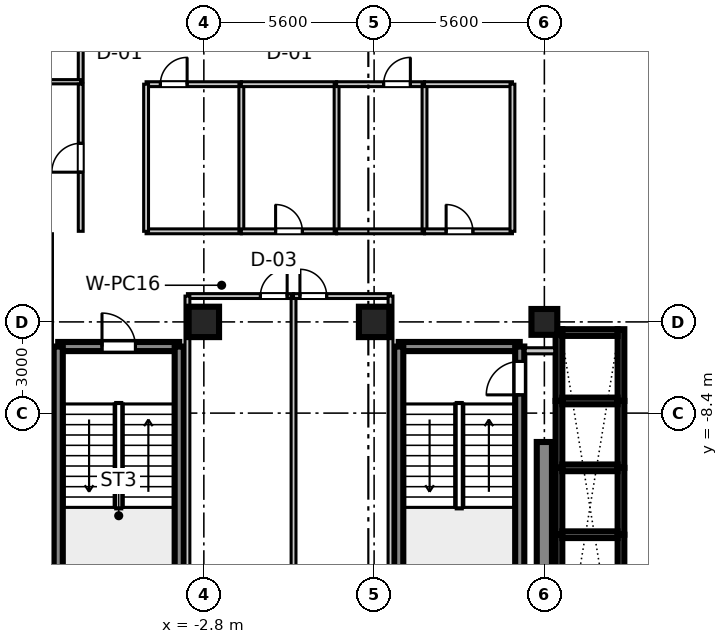
"""IFC4 building model, lengths in metres.
Left out: names, types, materials, properties, quantities, classifications, styles, units other than length and angle.
Written with IfcOpenShell. Run it as: python <this file> out.ifc"""

import sys

from ifc_helpers import new_model, si_unit, direction, frame, frame_2d, origin, origin_2d, place, context, subcontext, project, spatial, rectangle, extrude, source, transform, mapped, element, fill, save


model = new_model("IFC4")
c1 = context("Model", 3, precision=1e-05, world=origin(), true_north=direction((0.0, 1.0)))
c2 = subcontext(c1, "Body", "Model", "MODEL_VIEW")
j1 = project(units=[si_unit("LENGTHUNIT", "METRE"), si_unit("PLANEANGLEUNIT", "RADIAN")], contexts=[c1])
p1 = place(None, origin())
s1 = spatial("IfcSite", under=j1, at=p1, CompositionType="ELEMENT")
p2 = place(p1, origin())
s2 = spatial("IfcBuilding", under=s1, at=p2, CompositionType="ELEMENT")
p3 = place(p2, frame((0.0, 0.0, 227.1)))
s3 = spatial("IfcBuildingStorey", under=s2, at=p3, CompositionType="ELEMENT", Elevation=227.1)
m1 = source(origin(), c2, "Body", "SweptSolid", [
    extrude(rectangle(XDim=1.0, YDim=1.0, at=origin_2d()), origin(), (0.0, 0.0, 1.0), 3.655),
])
for number, where, z_axis, x_axis in (
    (1, (-2.8, -5.4, 0.0), (0.0, 0.0, 1.0), (1.0, 0.0, 0.0)),
    (2, (2.8, -5.4, 0.0), (0.0, 0.0, 1.0), (1.0, 0.0, 0.0)),
):
    element("IfcColumn", number, at=place(p3, frame(where, z_axis=z_axis, x_axis=x_axis)), inside=s3, PredefinedType="COLUMN", context=c2, shape_type="MappedRepresentation", body=[
        mapped(m1, transform((0.0, 0.0, 0.0), scale=1.0)),
    ])
m2 = source(origin(), c2, "Body", "SweptSolid", [
    extrude(rectangle(XDim=0.85, YDim=0.85, at=origin_2d()), origin(), (0.0, 0.0, 1.0), 3.655),
])
p4 = place(p3, frame((8.4, -5.4, 0.0), z_axis=(0.0, 0.0, 1.0), x_axis=(1.0, 0.0, 0.0)))
e3 = element("IfcColumn", 3, at=p4, inside=s3, PredefinedType="PILASTER", context=c2, shape_type="MappedRepresentation", body=[
    mapped(m2, transform((0.0, 0.0, 0.0), scale=1.0)),
])
m3 = source(origin(), c2, "Body", "SweptSolid", [
    extrude(rectangle(XDim=7.65, YDim=0.5, at=frame_2d((3.825, 0.0))), origin(), (0.0, 0.0, 1.0), 3.41),
])
p5 = place(p3, frame((8.4, -17.0, 0.0), z_axis=(0.0, 0.0, 1.0), x_axis=(0.0, 1.0, 0.0)))
e4 = element("IfcWall", 4, at=p5, inside=s3, PredefinedType="SHEAR", context=c2, shape_type="MappedRepresentation", body=[
    mapped(m3, transform((0.0, 0.0, 0.0), scale=1.0)),
])
m4 = source(origin(), c2, "Body", "SweptSolid", [
    extrude(rectangle(XDim=3.98, YDim=0.3, at=frame_2d((1.99, 0.0))), origin(), (0.0, 0.0, 1.0), 3.41),
])
p6 = place(p3, frame((3.61, -6.21, 0.0), z_axis=(0.0, 0.0, 1.0), x_axis=(1.0, 0.0, 0.0)))
e5 = element("IfcWall", 5, at=p6, inside=s3, PredefinedType="SHEAR", context=c2, shape_type="MappedRepresentation", body=[
    mapped(m4, transform((0.0, 0.0, 0.0), scale=1.0)),
])
m5 = source(origin(), c2, "Body", "SweptSolid", [
    extrude(rectangle(XDim=9.38, YDim=0.3, at=frame_2d((4.69, 0.0))), origin(), (0.0, 0.0, 1.0), 3.41),
])
p7 = place(p3, frame((3.61, -15.59, 0.0), z_axis=(0.0, 0.0, 1.0), x_axis=(0.0, 1.0, 0.0)))
e6 = element("IfcWall", 6, at=p7, inside=s3, PredefinedType="SHEAR", context=c2, shape_type="MappedRepresentation", body=[
    mapped(m5, transform((0.0, 0.0, 0.0), scale=1.0)),
])
p8 = place(p3, frame((7.59, -15.59, 0.0), z_axis=(0.0, 0.0, 1.0), x_axis=(0.0, 1.0, 0.0)))
e7 = element("IfcWall", 7, at=p8, inside=s3, PredefinedType="SHEAR", context=c2, shape_type="MappedRepresentation", body=[
    mapped(m5, transform((0.0, 0.0, 0.0), scale=1.0)),
])
p9 = place(p8, frame((7.79, 0.0, 0.0)))
e8 = element("IfcOpeningElement", 8, at=p9, cuts=e7, PredefinedType="OPENING", context=c2, shape_type="SweptSolid", body=[
    extrude(rectangle(XDim=1.1, YDim=2.15, at=frame_2d((0.55, 1.075))), frame((0.0, 0.16, 0.0), z_axis=(0.0, -1.0, 0.0), x_axis=(1.0, 0.0, 0.0)), (0.0, 0.0, 1.0), 0.32),
])
p10 = place(p3, frame((-7.59, -6.21, 0.0), z_axis=(0.0, 0.0, 1.0), x_axis=(1.0, 0.0, 0.0)))
e9 = element("IfcWall", 9, at=p10, inside=s3, PredefinedType="SHEAR", context=c2, shape_type="MappedRepresentation", body=[
    mapped(m4, transform((0.0, 0.0, 0.0), scale=1.0)),
])
p11 = place(p10, frame((1.44, 0.0, 0.0)))
e10 = element("IfcOpeningElement", 10, at=p11, cuts=e9, PredefinedType="OPENING", context=c2, shape_type="SweptSolid", body=[
    extrude(rectangle(XDim=1.1, YDim=2.15, at=frame_2d((0.55, 1.075))), frame((0.0, 0.16, 0.0), z_axis=(0.0, -1.0, 0.0), x_axis=(1.0, 0.0, 0.0)), (0.0, 0.0, 1.0), 0.32),
])
for number, where, z_axis, x_axis in (
    (11, (-7.59, -15.59, 0.0), (0.0, 0.0, 1.0), (0.0, 1.0, 0.0)),
    (12, (-3.61, -15.59, 0.0), (0.0, 0.0, 1.0), (0.0, 1.0, 0.0)),
):
    element("IfcWall", number, at=place(p3, frame(where, z_axis=z_axis, x_axis=x_axis)), inside=s3, PredefinedType="SHEAR", context=c2, shape_type="MappedRepresentation", body=[
        mapped(m5, transform((0.0, 0.0, 0.0), scale=1.0)),
    ])
m6 = source(origin(), c2, "Body", "SweptSolid", [
    extrude(rectangle(XDim=2.36, YDim=0.22, at=frame_2d((1.18, 0.0))), origin(), (0.0, 0.0, 1.0), 3.41),
])
for number, where, z_axis, x_axis in (
    (13, (8.88, -8.0, 0.0), (0.0, 0.0, 1.0), (0.0, 1.0, 0.0)),
    (14, (10.92, -8.0, 0.0), (0.0, 0.0, 1.0), (0.0, 1.0, 0.0)),
):
    element("IfcWall", number, at=place(p3, frame(where, z_axis=z_axis, x_axis=x_axis)), inside=s3, PredefinedType="SHEAR", context=c2, shape_type="MappedRepresentation", body=[
        mapped(m6, transform((0.0, 0.0, 0.0), scale=1.0)),
    ])
m7 = source(origin(), c2, "Body", "SweptSolid", [
    extrude(rectangle(XDim=1.82, YDim=0.22, at=frame_2d((0.91, 0.0))), origin(), (0.0, 0.0, 1.0), 3.41),
])
p12 = place(p3, frame((8.99, -5.75, 0.0), z_axis=(0.0, 0.0, 1.0), x_axis=(1.0, 0.0, 0.0)))
e15 = element("IfcWall", 15, at=p12, inside=s3, PredefinedType="SHEAR", context=c2, shape_type="MappedRepresentation", body=[
    mapped(m7, transform((0.0, 0.0, 0.0), scale=1.0)),
])
m8 = source(origin(), c2, "Body", "SweptSolid", [
    extrude(rectangle(XDim=2.2, YDim=0.22, at=frame_2d((1.1, 0.0))), origin(), (0.0, 0.0, 1.0), 3.41),
])
for number, where, z_axis, x_axis in (
    (16, (8.88, -10.2, 0.0), (0.0, 0.0, 1.0), (0.0, 1.0, 0.0)),
    (17, (10.92, -10.2, 0.0), (0.0, 0.0, 1.0), (0.0, 1.0, 0.0)),
):
    element("IfcWall", number, at=place(p3, frame(where, z_axis=z_axis, x_axis=x_axis)), inside=s3, PredefinedType="SHEAR", context=c2, shape_type="MappedRepresentation", body=[
        mapped(m8, transform((0.0, 0.0, 0.0), scale=1.0)),
    ])
m9 = source(origin(), c2, "Body", "SweptSolid", [
    extrude(rectangle(XDim=1.82, YDim=0.22, at=frame_2d((0.91, 0.0))), origin(), (0.0, 0.0, 1.0), 3.7),
])
p13 = place(p3, frame((8.99, -8.0, 0.0), z_axis=(0.0, 0.0, 1.0), x_axis=(1.0, 0.0, 0.0)))
e18 = element("IfcWall", 18, at=p13, inside=s3, PredefinedType="SHEAR", context=c2, shape_type="MappedRepresentation", body=[
    mapped(m9, transform((0.0, 0.0, 0.0), scale=1.0)),
])
for number, where, z_axis, x_axis in (
    (19, (8.88, -12.4, 0.0), (0.0, 0.0, 1.0), (0.0, 1.0, 0.0)),
    (20, (10.92, -12.4, 0.0), (0.0, 0.0, 1.0), (0.0, 1.0, 0.0)),
):
    element("IfcWall", number, at=place(p3, frame(where, z_axis=z_axis, x_axis=x_axis)), inside=s3, PredefinedType="SHEAR", context=c2, shape_type="MappedRepresentation", body=[
        mapped(m8, transform((0.0, 0.0, 0.0), scale=1.0)),
    ])
p14 = place(p3, frame((8.99, -10.2, 0.0), z_axis=(0.0, 0.0, 1.0), x_axis=(1.0, 0.0, 0.0)))
e21 = element("IfcWall", 21, at=p14, inside=s3, PredefinedType="SHEAR", context=c2, shape_type="MappedRepresentation", body=[
    mapped(m9, transform((0.0, 0.0, 0.0), scale=1.0)),
])
m10 = source(origin(), c2, "Body", "SweptSolid", [
    extrude(rectangle(XDim=2.325, YDim=0.22, at=frame_2d((1.163, 0.0))), origin(), (0.0, 0.0, 1.0), 3.41),
])
for number, where, z_axis, x_axis in (
    (22, (8.88, -14.725, 0.0), (0.0, 0.0, 1.0), (0.0, 1.0, 0.0)),
    (23, (10.92, -14.725, 0.0), (0.0, 0.0, 1.0), (0.0, 1.0, 0.0)),
):
    element("IfcWall", number, at=place(p3, frame(where, z_axis=z_axis, x_axis=x_axis)), inside=s3, PredefinedType="SHEAR", context=c2, shape_type="MappedRepresentation", body=[
        mapped(m10, transform((0.0, 0.0, 0.0), scale=1.0)),
    ])
p15 = place(p3, frame((8.99, -12.4, 0.0), z_axis=(0.0, 0.0, 1.0), x_axis=(1.0, 0.0, 0.0)))
e24 = element("IfcWall", 24, at=p15, inside=s3, PredefinedType="SHEAR", context=c2, shape_type="MappedRepresentation", body=[
    mapped(m9, transform((0.0, 0.0, 0.0), scale=1.0)),
])
m11 = source(origin(), c2, "Body", "SweptSolid", [
    extrude(rectangle(XDim=0.97, YDim=0.2, at=frame_2d((0.485, 0.0))), origin(), (0.0, 0.0, 1.0), 2.75),
])
p16 = place(p3, frame((7.77, -6.35, 0.0), z_axis=(0.0, 0.0, 1.0), x_axis=(1.0, 0.0, 0.0)))
e25 = element("IfcWall", 25, at=p16, inside=s3, PredefinedType="PARTITIONING", context=c2, shape_type="MappedRepresentation", body=[
    mapped(m11, transform((0.0, 0.0, 0.0), scale=1.0)),
])
m12 = source(origin(), c2, "Body", "SweptSolid", [
    extrude(rectangle(XDim=21.4, YDim=0.16, at=frame_2d((10.7, 0.0))), origin(), (0.0, 0.0, 1.0), 2.75),
])
p17 = place(p3, frame((-6.85, 2.5, 0.0), z_axis=(0.0, 0.0, 1.0), x_axis=(0.0, 1.0, 0.0)))
e26 = element("IfcWall", 26, at=p17, inside=s3, PredefinedType="PARTITIONING", context=c2, shape_type="MappedRepresentation", body=[
    mapped(m12, transform((0.0, 0.0, 0.0), scale=1.0)),
])
p18 = place(p17, frame((8.15, 0.0, 0.0)))
e27 = element("IfcOpeningElement", 27, at=p18, cuts=e26, PredefinedType="OPENING", context=c2, shape_type="SweptSolid", body=[
    extrude(rectangle(XDim=0.95, YDim=2.1, at=frame_2d((0.475, 1.05))), frame((0.0, 0.09, 0.0), z_axis=(0.0, -1.0, 0.0), x_axis=(1.0, 0.0, 0.0)), (0.0, 0.0, 1.0), 0.18),
])
m13 = source(origin(), c2, "Body", "SweptSolid", [
    extrude(rectangle(XDim=14.31, YDim=0.14, at=frame_2d((7.155, 0.0))), origin(), (0.0, 0.0, 1.0), 2.75),
])
p19 = place(p3, frame((-21.16, 2.5, 0.0), z_axis=(0.0, 0.0, 1.0), x_axis=(1.0, 0.0, 0.0)))
e28 = element("IfcWall", 28, at=p19, inside=s3, PredefinedType="PARTITIONING", context=c2, shape_type="MappedRepresentation", body=[
    mapped(m13, transform((0.0, 0.0, 0.0), scale=1.0)),
])
m14 = source(origin(), c2, "Body", "SweptSolid", [
    extrude(rectangle(XDim=10.7, YDim=0.16, at=frame_2d((5.35, 0.0))), origin(), (0.0, 0.0, 1.0), 2.75),
])
p20 = place(p3, frame((-7.86, -23.9, 0.0), z_axis=(0.0, 0.0, 1.0), x_axis=(0.0, 1.0, 0.0)))
e29 = element("IfcWall", 29, at=p20, inside=s3, PredefinedType="PARTITIONING", context=c2, shape_type="MappedRepresentation", body=[
    mapped(m14, transform((0.0, 0.0, 0.0), scale=1.0)),
])
p21 = place(p3, frame((-7.86, -13.2, 0.0), z_axis=(0.0, 0.0, 1.0), x_axis=(0.0, 1.0, 0.0)))
e30 = element("IfcWall", 30, at=p21, inside=s3, PredefinedType="PARTITIONING", context=c2, shape_type="MappedRepresentation", body=[
    mapped(m14, transform((0.0, 0.0, 0.0), scale=1.0)),
])
p22 = place(p21, frame((9.26, 0.0, 0.0)))
e31 = element("IfcOpeningElement", 31, at=p22, cuts=e30, PredefinedType="OPENING", context=c2, shape_type="SweptSolid", body=[
    extrude(rectangle(XDim=0.88, YDim=2.1, at=frame_2d((0.44, 1.05))), frame((0.0, 0.09, 0.0), z_axis=(0.0, -1.0, 0.0), x_axis=(1.0, 0.0, 0.0)), (0.0, 0.0, 1.0), 0.18),
])
m15 = source(origin(), c2, "Body", "SweptSolid", [
    extrude(rectangle(XDim=3.49, YDim=0.16, at=frame_2d((1.745, 0.0))), origin(), (0.0, 0.0, 1.0), 2.75),
])
p23 = place(p3, frame((-3.34, -4.55, 0.0), z_axis=(0.0, 0.0, 1.0), x_axis=(1.0, 0.0, 0.0)))
e32 = element("IfcWall", 32, at=p23, inside=s3, PredefinedType="PARTITIONING", context=c2, shape_type="MappedRepresentation", body=[
    mapped(m15, transform((0.0, 0.0, 0.0), scale=1.0)),
])
p24 = place(p23, frame((2.4, 0.0, 0.0)))
e33 = element("IfcOpeningElement", 33, at=p24, cuts=e32, PredefinedType="OPENING", context=c2, shape_type="SweptSolid", body=[
    extrude(rectangle(XDim=0.88, YDim=2.1, at=frame_2d((0.44, 1.05))), frame((0.0, 0.09, 0.0), z_axis=(0.0, -1.0, 0.0), x_axis=(1.0, 0.0, 0.0)), (0.0, 0.0, 1.0), 0.18),
])
m16 = source(origin(), c2, "Body", "SweptSolid", [
    extrude(rectangle(XDim=19.35, YDim=0.16, at=frame_2d((9.675, 0.0))), origin(), (0.0, 0.0, 1.0), 2.75),
])
for number, where, z_axis, x_axis in (
    (34, (-3.34, -23.9, 0.0), (0.0, 0.0, 1.0), (0.0, 1.0, 0.0)),
    (35, (0.15, -23.9, 0.0), (0.0, 0.0, 1.0), (0.0, 1.0, 0.0)),
):
    element("IfcWall", number, at=place(p3, frame(where, z_axis=z_axis, x_axis=x_axis)), inside=s3, PredefinedType="PARTITIONING", context=c2, shape_type="MappedRepresentation", body=[
        mapped(m16, transform((0.0, 0.0, 0.0), scale=1.0)),
    ])
m17 = source(origin(), c2, "Body", "SweptSolid", [
    extrude(rectangle(XDim=3.19, YDim=0.16, at=frame_2d((1.595, 0.0))), origin(), (0.0, 0.0, 1.0), 2.75),
])
p25 = place(p3, frame((0.15, -4.55, 0.0), z_axis=(0.0, 0.0, 1.0), x_axis=(1.0, 0.0, 0.0)))
e36 = element("IfcWall", 36, at=p25, inside=s3, PredefinedType="PARTITIONING", context=c2, shape_type="MappedRepresentation", body=[
    mapped(m17, transform((0.0, 0.0, 0.0), scale=1.0)),
])
p26 = place(p25, frame((0.21, 0.0, 0.0)))
e37 = element("IfcOpeningElement", 37, at=p26, cuts=e36, PredefinedType="OPENING", context=c2, shape_type="SweptSolid", body=[
    extrude(rectangle(XDim=0.88, YDim=2.1, at=frame_2d((0.44, 1.05))), frame((0.0, 0.09, 0.0), z_axis=(0.0, -1.0, 0.0), x_axis=(1.0, 0.0, 0.0)), (0.0, 0.0, 1.0), 0.18),
])
p27 = place(p3, frame((3.34, -23.9, 0.0), z_axis=(0.0, 0.0, 1.0), x_axis=(0.0, 1.0, 0.0)))
e38 = element("IfcWall", 38, at=p27, inside=s3, PredefinedType="PARTITIONING", context=c2, shape_type="MappedRepresentation", body=[
    mapped(m16, transform((0.0, 0.0, 0.0), scale=1.0)),
])
m18 = source(origin(), c2, "Body", "SweptSolid", [
    extrude(rectangle(XDim=4.84, YDim=0.16, at=frame_2d((2.42, 0.0))), origin(), (0.0, 0.0, 1.0), 2.75),
])
p28 = place(p3, frame((-6.85, -2.42, 0.0), z_axis=(0.0, 0.0, 1.0), x_axis=(0.0, 1.0, 0.0)))
e39 = element("IfcWall", 39, at=p28, inside=s3, PredefinedType="PARTITIONING", context=c2, shape_type="MappedRepresentation", body=[
    mapped(m18, transform((0.0, 0.0, 0.0), scale=1.0)),
])
p29 = place(p28, frame((1.945, 0.0, 0.0)))
e40 = element("IfcOpeningElement", 40, at=p29, cuts=e39, PredefinedType="OPENING", context=c2, shape_type="SweptSolid", body=[
    extrude(rectangle(XDim=0.95, YDim=2.1, at=frame_2d((0.475, 1.05))), frame((0.0, 0.09, 0.0), z_axis=(0.0, -1.0, 0.0), x_axis=(1.0, 0.0, 0.0)), (0.0, 0.0, 1.0), 0.18),
])
m19 = source(origin(), c2, "Body", "SweptSolid", [
    extrude(rectangle(XDim=3.133, YDim=0.16, at=frame_2d((1.566, 0.0))), origin(), (0.0, 0.0, 1.0), 2.75),
])
p30 = place(p3, frame((-4.7, -2.42, 0.0), z_axis=(0.0, 0.0, 1.0), x_axis=(1.0, 0.0, 0.0)))
e41 = element("IfcWall", 41, at=p30, inside=s3, PredefinedType="PARTITIONING", context=c2, shape_type="MappedRepresentation", body=[
    mapped(m19, transform((0.0, 0.0, 0.0), scale=1.0)),
])
p31 = place(p3, frame((-4.7, 2.42, 0.0), z_axis=(0.0, 0.0, 1.0), x_axis=(1.0, 0.0, 0.0)))
e42 = element("IfcWall", 42, at=p31, inside=s3, PredefinedType="PARTITIONING", context=c2, shape_type="MappedRepresentation", body=[
    mapped(m19, transform((0.0, 0.0, 0.0), scale=1.0)),
])
p32 = place(p31, frame((0.47, 0.0, 0.0)))
e43 = element("IfcOpeningElement", 43, at=p32, cuts=e42, PredefinedType="OPENING", context=c2, shape_type="SweptSolid", body=[
    extrude(rectangle(XDim=0.88, YDim=2.1, at=frame_2d((0.44, 1.05))), frame((0.0, 0.09, 0.0), z_axis=(0.0, -1.0, 0.0), x_axis=(1.0, 0.0, 0.0)), (0.0, 0.0, 1.0), 0.18),
])
for number, where, z_axis, x_axis in (
    (44, (-4.7, -2.42, 0.0), (0.0, 0.0, 1.0), (0.0, 1.0, 0.0)),
    (45, (-1.567, -2.42, 0.0), (0.0, 0.0, 1.0), (0.0, 1.0, 0.0)),
):
    element("IfcWall", number, at=place(p3, frame(where, z_axis=z_axis, x_axis=x_axis)), inside=s3, PredefinedType="PARTITIONING", context=c2, shape_type="MappedRepresentation", body=[
        mapped(m18, transform((0.0, 0.0, 0.0), scale=1.0)),
    ])
m20 = source(origin(), c2, "Body", "SweptSolid", [
    extrude(rectangle(XDim=3.133, YDim=0.16, at=frame_2d((1.566, 0.0))), origin(), (0.0, 0.0, 1.0), 2.75),
])
p33 = place(p3, frame((-1.567, -2.42, 0.0), z_axis=(0.0, 0.0, 1.0), x_axis=(1.0, 0.0, 0.0)))
e46 = element("IfcWall", 46, at=p33, inside=s3, PredefinedType="PARTITIONING", context=c2, shape_type="MappedRepresentation", body=[
    mapped(m20, transform((0.0, 0.0, 0.0), scale=1.0)),
])
p34 = place(p33, frame((1.127, 0.0, 0.0)))
e47 = element("IfcOpeningElement", 47, at=p34, cuts=e46, PredefinedType="OPENING", context=c2, shape_type="SweptSolid", body=[
    extrude(rectangle(XDim=0.88, YDim=2.1, at=frame_2d((0.44, 1.05))), frame((0.0, 0.09, 0.0), z_axis=(0.0, -1.0, 0.0), x_axis=(1.0, 0.0, 0.0)), (0.0, 0.0, 1.0), 0.18),
])
p35 = place(p3, frame((-1.567, 2.42, 0.0), z_axis=(0.0, 0.0, 1.0), x_axis=(1.0, 0.0, 0.0)))
e48 = element("IfcWall", 48, at=p35, inside=s3, PredefinedType="PARTITIONING", context=c2, shape_type="MappedRepresentation", body=[
    mapped(m20, transform((0.0, 0.0, 0.0), scale=1.0)),
])
p36 = place(p3, frame((1.566, -2.42, 0.0), z_axis=(0.0, 0.0, 1.0), x_axis=(0.0, 1.0, 0.0)))
e49 = element("IfcWall", 49, at=p36, inside=s3, PredefinedType="PARTITIONING", context=c2, shape_type="MappedRepresentation", body=[
    mapped(m18, transform((0.0, 0.0, 0.0), scale=1.0)),
])
m21 = source(origin(), c2, "Body", "SweptSolid", [
    extrude(rectangle(XDim=2.892, YDim=0.16, at=frame_2d((1.446, 0.0))), origin(), (0.0, 0.0, 1.0), 2.75),
])
p37 = place(p3, frame((1.566, -2.42, 0.0), z_axis=(0.0, 0.0, 1.0), x_axis=(1.0, 0.0, 0.0)))
e50 = element("IfcWall", 50, at=p37, inside=s3, PredefinedType="PARTITIONING", context=c2, shape_type="MappedRepresentation", body=[
    mapped(m21, transform((0.0, 0.0, 0.0), scale=1.0)),
])
p38 = place(p3, frame((1.566, 2.42, 0.0), z_axis=(0.0, 0.0, 1.0), x_axis=(1.0, 0.0, 0.0)))
e51 = element("IfcWall", 51, at=p38, inside=s3, PredefinedType="PARTITIONING", context=c2, shape_type="MappedRepresentation", body=[
    mapped(m21, transform((0.0, 0.0, 0.0), scale=1.0)),
])
p39 = place(p38, frame((1.547, 0.0, 0.0)))
e52 = element("IfcOpeningElement", 52, at=p39, cuts=e51, PredefinedType="OPENING", context=c2, shape_type="SweptSolid", body=[
    extrude(rectangle(XDim=0.88, YDim=2.1, at=frame_2d((0.44, 1.05))), frame((0.0, 0.09, 0.0), z_axis=(0.0, -1.0, 0.0), x_axis=(1.0, 0.0, 0.0)), (0.0, 0.0, 1.0), 0.18),
])
p40 = place(p3, frame((4.458, -2.42, 0.0), z_axis=(0.0, 0.0, 1.0), x_axis=(0.0, 1.0, 0.0)))
e53 = element("IfcWall", 53, at=p40, inside=s3, PredefinedType="PARTITIONING", context=c2, shape_type="MappedRepresentation", body=[
    mapped(m18, transform((0.0, 0.0, 0.0), scale=1.0)),
])
p41 = place(p3, frame((4.458, -2.42, 0.0), z_axis=(0.0, 0.0, 1.0), x_axis=(1.0, 0.0, 0.0)))
e54 = element("IfcWall", 54, at=p41, inside=s3, PredefinedType="PARTITIONING", context=c2, shape_type="MappedRepresentation", body=[
    mapped(m21, transform((0.0, 0.0, 0.0), scale=1.0)),
])
p42 = place(p41, frame((0.711, 0.0, 0.0)))
e55 = element("IfcOpeningElement", 55, at=p42, cuts=e54, PredefinedType="OPENING", context=c2, shape_type="SweptSolid", body=[
    extrude(rectangle(XDim=0.88, YDim=2.1, at=frame_2d((0.44, 1.05))), frame((0.0, 0.09, 0.0), z_axis=(0.0, -1.0, 0.0), x_axis=(1.0, 0.0, 0.0)), (0.0, 0.0, 1.0), 0.18),
])
p43 = place(p3, frame((4.458, 2.42, 0.0), z_axis=(0.0, 0.0, 1.0), x_axis=(1.0, 0.0, 0.0)))
e56 = element("IfcWall", 56, at=p43, inside=s3, PredefinedType="PARTITIONING", context=c2, shape_type="MappedRepresentation", body=[
    mapped(m21, transform((0.0, 0.0, 0.0), scale=1.0)),
])
p44 = place(p3, frame((7.35, -2.42, 0.0), z_axis=(0.0, 0.0, 1.0), x_axis=(0.0, 1.0, 0.0)))
e57 = element("IfcWall", 57, at=p44, inside=s3, PredefinedType="PARTITIONING", context=c2, shape_type="MappedRepresentation", body=[
    mapped(m18, transform((0.0, 0.0, 0.0), scale=1.0)),
])
m22 = source(origin(), c2, "Body", "SweptSolid", [
    extrude(rectangle(XDim=1.1, YDim=2.15, at=frame_2d((0.55, 1.075))), frame((0.0, 0.025, 0.0), z_axis=(0.0, -1.0, 0.0), x_axis=(1.0, 0.0, 0.0)), (0.0, 0.0, 1.0), 0.05),
])
p45 = place(p9, origin())
e58 = element("IfcDoor", 58, at=p45, inside=s3, OperationType="SINGLE_SWING_LEFT", PredefinedType="DOOR", context=c2, shape_type="MappedRepresentation", body=[
    mapped(m22, transform((0.0, 0.0, 0.0), scale=1.0)),
])
fill(e8, e58)
p46 = place(p11, frame((1.1, 0.0, 0.0), z_axis=(0.0, 0.0, 1.0), x_axis=(-1.0, 0.0, 0.0)))
e59 = element("IfcDoor", 59, at=p46, inside=s3, OperationType="SINGLE_SWING_LEFT", PredefinedType="DOOR", context=c2, shape_type="MappedRepresentation", body=[
    mapped(m22, transform((0.0, 0.0, 0.0), scale=1.0)),
])
fill(e10, e59)
m23 = source(origin(), c2, "Body", "SweptSolid", [
    extrude(rectangle(XDim=0.88, YDim=2.1, at=frame_2d((0.44, 1.05))), frame((0.0, 0.025, 0.0), z_axis=(0.0, -1.0, 0.0), x_axis=(1.0, 0.0, 0.0)), (0.0, 0.0, 1.0), 0.05),
])
p47 = place(p24, frame((0.88, 0.0, 0.0), z_axis=(0.0, 0.0, 1.0), x_axis=(-1.0, 0.0, 0.0)))
e60 = element("IfcDoor", 60, at=p47, inside=s3, OperationType="SINGLE_SWING_RIGHT", PredefinedType="DOOR", context=c2, shape_type="MappedRepresentation", body=[
    mapped(m23, transform((0.0, 0.0, 0.0), scale=1.0)),
])
fill(e33, e60)
p48 = place(p26, frame((0.88, 0.0, 0.0), z_axis=(0.0, 0.0, 1.0), x_axis=(-1.0, 0.0, 0.0)))
e61 = element("IfcDoor", 61, at=p48, inside=s3, OperationType="SINGLE_SWING_LEFT", PredefinedType="DOOR", context=c2, shape_type="MappedRepresentation", body=[
    mapped(m23, transform((0.0, 0.0, 0.0), scale=1.0)),
])
fill(e37, e61)
m24 = source(origin(), c2, "Body", "SweptSolid", [
    extrude(rectangle(XDim=0.95, YDim=2.1, at=frame_2d((0.475, 1.05))), frame((0.0, 0.025, 0.0), z_axis=(0.0, -1.0, 0.0), x_axis=(1.0, 0.0, 0.0)), (0.0, 0.0, 1.0), 0.05),
])
p49 = place(p29, origin())
e62 = element("IfcDoor", 62, at=p49, inside=s3, OperationType="SINGLE_SWING_LEFT", PredefinedType="DOOR", context=c2, shape_type="MappedRepresentation", body=[
    mapped(m24, transform((0.0, 0.0, 0.0), scale=1.0)),
])
fill(e40, e62)
p50 = place(p32, frame((0.88, 0.0, 0.0), z_axis=(0.0, 0.0, 1.0), x_axis=(-1.0, 0.0, 0.0)))
e63 = element("IfcDoor", 63, at=p50, inside=s3, OperationType="SINGLE_SWING_RIGHT", PredefinedType="DOOR", context=c2, shape_type="MappedRepresentation", body=[
    mapped(m23, transform((0.0, 0.0, 0.0), scale=1.0)),
])
fill(e43, e63)
p51 = place(p34, origin())
e64 = element("IfcDoor", 64, at=p51, inside=s3, OperationType="SINGLE_SWING_LEFT", PredefinedType="DOOR", context=c2, shape_type="MappedRepresentation", body=[
    mapped(m23, transform((0.0, 0.0, 0.0), scale=1.0)),
])
fill(e47, e64)
p52 = place(p39, frame((0.88, 0.0, 0.0), z_axis=(0.0, 0.0, 1.0), x_axis=(-1.0, 0.0, 0.0)))
e65 = element("IfcDoor", 65, at=p52, inside=s3, OperationType="SINGLE_SWING_RIGHT", PredefinedType="DOOR", context=c2, shape_type="MappedRepresentation", body=[
    mapped(m23, transform((0.0, 0.0, 0.0), scale=1.0)),
])
fill(e52, e65)
p53 = place(p42, origin())
e66 = element("IfcDoor", 66, at=p53, inside=s3, OperationType="SINGLE_SWING_LEFT", PredefinedType="DOOR", context=c2, shape_type="MappedRepresentation", body=[
    mapped(m23, transform((0.0, 0.0, 0.0), scale=1.0)),
])
fill(e55, e66)
save(model, sys.argv[1])
